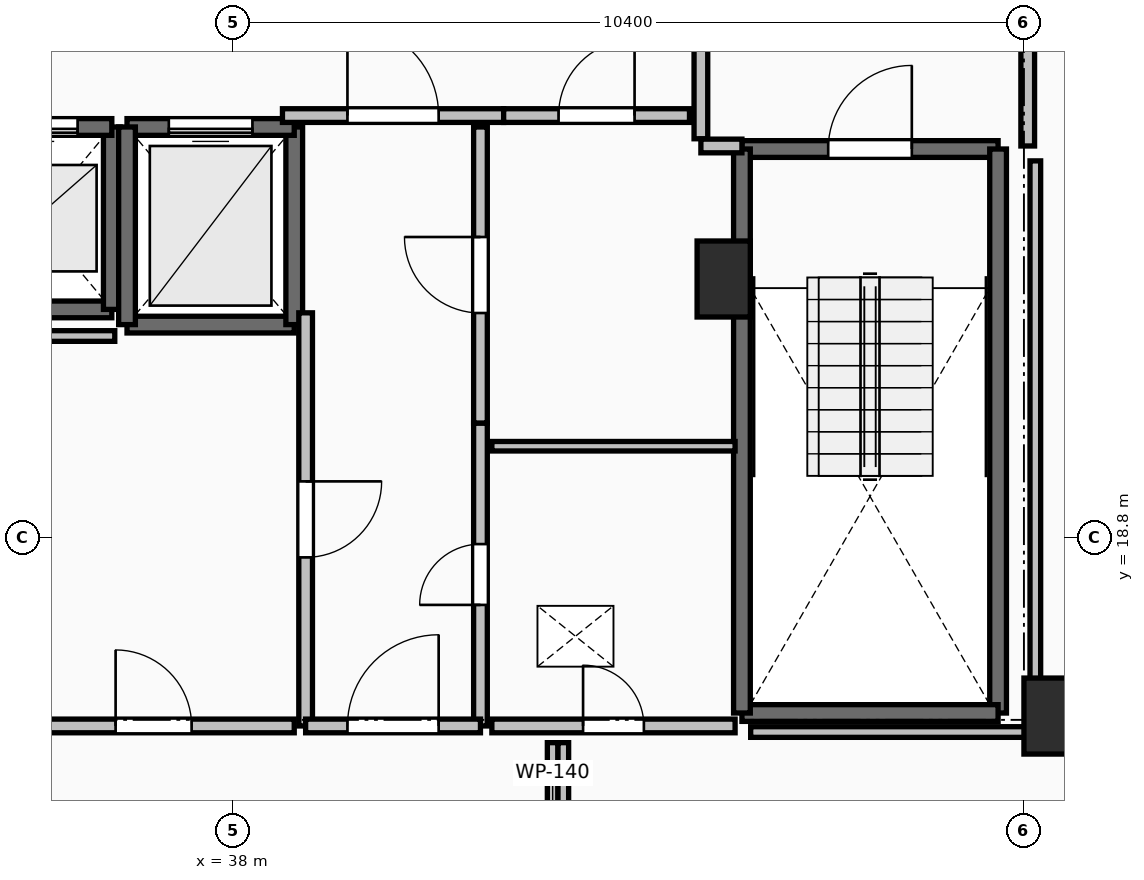
"""IFC4 building model, lengths in metres.
Left out: names, types, materials, properties, quantities, classifications, styles, units other than length and angle.
Written with IfcOpenShell. Run it as: python <this file> out.ifc"""

import sys

from ifc_helpers import new_model, si_unit, direction, frame, frame_2d, origin, origin_2d, place, context, subcontext, project, spatial, rectangle, extrude, element, fill, save


model = new_model("IFC4")
c1 = context("Model", 3, precision=1e-05, world=origin(), true_north=direction((0.0, 1.0)))
c2 = subcontext(c1, "Body", "Model", "MODEL_VIEW")
j1 = project(units=[si_unit("LENGTHUNIT", "METRE"), si_unit("PLANEANGLEUNIT", "RADIAN")], contexts=[c1])
p1 = place(None, origin())
s1 = spatial("IfcSite", under=j1, at=p1, CompositionType="ELEMENT")
p2 = place(p1, origin())
s2 = spatial("IfcBuilding", under=s1, at=p2, CompositionType="ELEMENT")
p3 = place(p2, frame((0.0, 0.0, 189.6)))
s3 = spatial("IfcBuildingStorey", under=s2, at=p3, CompositionType="ELEMENT", Elevation=189.6)
for number, where, z_axis, x_axis in (
    (1, (48.75, 16.45, 0.0), (0.0, 0.0, 1.0), (1.0, 0.0, 0.0)),
    (2, (44.45, 22.2, 0.0), (0.0, 0.0, 1.0), (1.0, 0.0, 0.0)),
):
    element("IfcColumn", number, at=place(p3, frame(where, z_axis=z_axis, x_axis=x_axis)), inside=s3, PredefinedType="PILASTER", context=c2, shape_type="SweptSolid", body=[
        extrude(rectangle(XDim=0.7, YDim=1.0, at=origin_2d()), origin(), (0.0, 0.0, 1.0), 3.5),
    ])
p4 = place(p3, frame((44.69, 23.91, 0.0), z_axis=(0.0, 0.0, 1.0), x_axis=(1.0, 0.0, 0.0)))
e3 = element("IfcWall", 3, at=p4, inside=s3, PredefinedType="SOLIDWALL", context=c2, shape_type="SweptSolid", body=[
    extrude(rectangle(XDim=3.37, YDim=0.22, at=frame_2d((1.685, 0.0))), origin(), (0.0, 0.0, 1.0), 3.24),
])
p5 = place(p4, frame((1.135, 0.0, 0.0)))
e4 = element("IfcOpeningElement", 4, at=p5, cuts=e3, PredefinedType="OPENING", context=c2, shape_type="SweptSolid", body=[
    extrude(rectangle(XDim=1.1, YDim=2.15, at=frame_2d((0.55, 1.075))), frame((0.0, 0.125, 0.0), z_axis=(0.0, -1.0, 0.0), x_axis=(1.0, 0.0, 0.0)), (0.0, 0.0, 1.0), 0.25),
])
p6 = place(p3, frame((48.06, 23.91, 0.0), z_axis=(0.0, 0.0, 1.0), x_axis=(0.0, -1.0, 0.0)))
e5 = element("IfcWall", 5, at=p6, inside=s3, PredefinedType="SOLIDWALL", context=c2, shape_type="SweptSolid", body=[
    extrude(rectangle(XDim=7.42, YDim=0.22, at=frame_2d((3.71, 0.0))), origin(), (0.0, 0.0, 1.0), 3.24),
])
p7 = place(p3, frame((48.06, 16.49, 0.0), z_axis=(0.0, 0.0, 1.0), x_axis=(-1.0, 0.0, 0.0)))
e6 = element("IfcWall", 6, at=p7, inside=s3, PredefinedType="SOLIDWALL", context=c2, shape_type="SweptSolid", body=[
    extrude(rectangle(XDim=3.37, YDim=0.22, at=frame_2d((1.685, 0.0))), origin(), (0.0, 0.0, 1.0), 3.24),
])
p8 = place(p3, frame((44.69, 16.49, 0.0), z_axis=(0.0, 0.0, 1.0), x_axis=(0.0, 1.0, 0.0)))
e7 = element("IfcWall", 7, at=p8, inside=s3, PredefinedType="SOLIDWALL", context=c2, shape_type="SweptSolid", body=[
    extrude(rectangle(XDim=7.42, YDim=0.22, at=frame_2d((3.71, 0.0))), origin(), (0.0, 0.0, 1.0), 3.24),
])
p9 = place(p3, frame((34.4, 21.8, 0.0), z_axis=(0.0, 0.0, 1.0), x_axis=(1.0, 0.0, 0.0)))
e8 = element("IfcWall", 8, at=p9, inside=s3, PredefinedType="SOLIDWALL", context=c2, shape_type="SweptSolid", body=[
    extrude(rectangle(XDim=2.0, YDim=0.22, at=frame_2d((1.0, 0.0))), origin(), (0.0, 0.0, 1.0), 3.24),
])
p10 = place(p3, frame((36.4, 21.8, 0.0), z_axis=(0.0, 0.0, 1.0), x_axis=(0.0, 1.0, 0.0)))
e9 = element("IfcWall", 9, at=p10, inside=s3, PredefinedType="SOLIDWALL", context=c2, shape_type="SweptSolid", body=[
    extrude(rectangle(XDim=2.4, YDim=0.22, at=frame_2d((1.2, 0.0))), origin(), (0.0, 0.0, 1.0), 3.24),
])
p11 = place(p3, frame((36.4, 24.2, 0.0), z_axis=(0.0, 0.0, 1.0), x_axis=(-1.0, 0.0, 0.0)))
e10 = element("IfcWall", 10, at=p11, inside=s3, PredefinedType="SOLIDWALL", context=c2, shape_type="SweptSolid", body=[
    extrude(rectangle(XDim=2.0, YDim=0.22, at=frame_2d((1.0, 0.0))), origin(), (0.0, 0.0, 1.0), 3.24),
])
p12 = place(p11, frame((0.45, 0.0, 0.0)))
e11 = element("IfcOpeningElement", 11, at=p12, cuts=e10, PredefinedType="OPENING", context=c2, shape_type="SweptSolid", body=[
    extrude(rectangle(XDim=1.1, YDim=2.2, at=frame_2d((0.55, 1.1))), frame((0.0, 0.125, 0.0), z_axis=(0.0, -1.0, 0.0), x_axis=(1.0, 0.0, 0.0)), (0.0, 0.0, 1.0), 0.25),
])
p13 = place(p3, frame((36.6, 21.6, 0.0), z_axis=(0.0, 0.0, 1.0), x_axis=(1.0, 0.0, 0.0)))
e12 = element("IfcWall", 12, at=p13, inside=s3, PredefinedType="SOLIDWALL", context=c2, shape_type="SweptSolid", body=[
    extrude(rectangle(XDim=2.2, YDim=0.22, at=frame_2d((1.1, 0.0))), origin(), (0.0, 0.0, 1.0), 3.24),
])
p14 = place(p3, frame((38.8, 21.6, 0.0), z_axis=(0.0, 0.0, 1.0), x_axis=(0.0, 1.0, 0.0)))
e13 = element("IfcWall", 13, at=p14, inside=s3, PredefinedType="SOLIDWALL", context=c2, shape_type="SweptSolid", body=[
    extrude(rectangle(XDim=2.6, YDim=0.22, at=frame_2d((1.3, 0.0))), origin(), (0.0, 0.0, 1.0), 3.24),
])
p15 = place(p3, frame((38.8, 24.2, 0.0), z_axis=(0.0, 0.0, 1.0), x_axis=(-1.0, 0.0, 0.0)))
e14 = element("IfcWall", 14, at=p15, inside=s3, PredefinedType="SOLIDWALL", context=c2, shape_type="SweptSolid", body=[
    extrude(rectangle(XDim=2.2, YDim=0.22, at=frame_2d((1.1, 0.0))), origin(), (0.0, 0.0, 1.0), 3.24),
])
p16 = place(p15, frame((0.55, 0.0, 0.0)))
e15 = element("IfcOpeningElement", 15, at=p16, cuts=e14, PredefinedType="OPENING", context=c2, shape_type="SweptSolid", body=[
    extrude(rectangle(XDim=1.1, YDim=2.2, at=frame_2d((0.55, 1.1))), frame((0.0, 0.125, 0.0), z_axis=(0.0, -1.0, 0.0), x_axis=(1.0, 0.0, 0.0)), (0.0, 0.0, 1.0), 0.25),
])
p17 = place(p3, frame((36.6, 24.2, 0.0), z_axis=(0.0, 0.0, 1.0), x_axis=(0.0, -1.0, 0.0)))
e16 = element("IfcWall", 16, at=p17, inside=s3, PredefinedType="SOLIDWALL", context=c2, shape_type="SweptSolid", body=[
    extrude(rectangle(XDim=2.6, YDim=0.22, at=frame_2d((1.3, 0.0))), origin(), (0.0, 0.0, 1.0), 3.24),
])
p18 = place(p3, frame((44.15, 27.955, 0.0), z_axis=(0.0, 0.0, 1.0), x_axis=(0.0, -1.0, 0.0)))
e17 = element("IfcWall", 17, at=p18, inside=s3, PredefinedType="PARTITIONING", context=c2, shape_type="SweptSolid", body=[
    extrude(rectangle(XDim=3.91, YDim=0.18, at=frame_2d((1.955, 0.0))), origin(), (0.0, 0.0, 1.0), 3.24),
])
p19 = place(p18, frame((1.355, 0.0, 0.0)))
e18 = element("IfcOpeningElement", 18, at=p19, cuts=e17, PredefinedType="OPENING", context=c2, shape_type="SweptSolid", body=[
    extrude(rectangle(XDim=1.2, YDim=2.15, at=frame_2d((0.6, 1.075))), frame((0.0, 0.105, 0.0), z_axis=(0.0, -1.0, 0.0), x_axis=(1.0, 0.0, 0.0)), (0.0, 0.0, 1.0), 0.21),
])
p20 = place(p3, frame((44.15, 23.95, 0.0), z_axis=(0.0, 0.0, 1.0), x_axis=(1.0, 0.0, 0.0)))
e19 = element("IfcWall", 19, at=p20, inside=s3, PredefinedType="PARTITIONING", context=c2, shape_type="SweptSolid", body=[
    extrude(rectangle(XDim=0.54, YDim=0.18, at=frame_2d((0.27, 0.0))), origin(), (0.0, 0.0, 1.0), 3.24),
])
p21 = place(p3, frame((48.45, 23.95, 0.0), z_axis=(0.0, 0.0, 1.0), x_axis=(0.0, 1.0, 0.0)))
e20 = element("IfcWall", 20, at=p21, inside=s3, PredefinedType="PARTITIONING", context=c2, shape_type="SweptSolid", body=[
    extrude(rectangle(XDim=4.05, YDim=0.18, at=frame_2d((2.025, 0.0))), origin(), (0.0, 0.0, 1.0), 3.24),
])
p22 = place(p21, frame((1.425, 0.0, 0.0)))
e21 = element("IfcOpeningElement", 21, at=p22, cuts=e20, PredefinedType="OPENING", context=c2, shape_type="SweptSolid", body=[
    extrude(rectangle(XDim=1.2, YDim=2.15, at=frame_2d((0.6, 1.075))), frame((0.0, 0.105, 0.0), z_axis=(0.0, -1.0, 0.0), x_axis=(1.0, 0.0, 0.0)), (0.0, 0.0, 1.0), 0.21),
])
p23 = place(p3, frame((38.645, 24.35, 0.0), z_axis=(0.0, 0.0, 1.0), x_axis=(1.0, 0.0, 0.0)))
e22 = element("IfcWall", 22, at=p23, inside=s3, PredefinedType="PARTITIONING", context=c2, shape_type="SweptSolid", body=[
    extrude(rectangle(XDim=2.91, YDim=0.18, at=frame_2d((1.455, 0.0))), origin(), (0.0, 0.0, 1.0), 3.24),
])
p24 = place(p23, frame((0.855, 0.0, 0.0)))
e23 = element("IfcOpeningElement", 23, at=p24, cuts=e22, PredefinedType="OPENING", context=c2, shape_type="SweptSolid", body=[
    extrude(rectangle(XDim=1.2, YDim=2.15, at=frame_2d((0.6, 1.075))), frame((0.0, 0.105, 0.0), z_axis=(0.0, -1.0, 0.0), x_axis=(1.0, 0.0, 0.0)), (0.0, 0.0, 1.0), 0.21),
])
p25 = place(p3, frame((41.555, 24.35, 0.0), z_axis=(0.0, 0.0, 1.0), x_axis=(1.0, 0.0, 0.0)))
e24 = element("IfcWall", 24, at=p25, inside=s3, PredefinedType="PARTITIONING", context=c2, shape_type="SweptSolid", body=[
    extrude(rectangle(XDim=2.445, YDim=0.18, at=frame_2d((1.223, 0.0))), origin(), (0.0, 0.0, 1.0), 3.24),
])
p26 = place(p25, frame((0.722, 0.0, 0.0)))
e25 = element("IfcOpeningElement", 25, at=p26, cuts=e24, PredefinedType="OPENING", context=c2, shape_type="SweptSolid", body=[
    extrude(rectangle(XDim=1.0, YDim=2.15, at=frame_2d((0.5, 1.075))), frame((0.0, 0.105, 0.0), z_axis=(0.0, -1.0, 0.0), x_axis=(1.0, 0.0, 0.0)), (0.0, 0.0, 1.0), 0.21),
])
p27 = place(p3, frame((41.25, 16.32, 0.0), z_axis=(0.0, 0.0, 1.0), x_axis=(0.0, 1.0, 0.0)))
e26 = element("IfcWall", 26, at=p27, inside=s3, PredefinedType="PARTITIONING", context=c2, shape_type="SweptSolid", body=[
    extrude(rectangle(XDim=3.985, YDim=0.18, at=frame_2d((1.992, 0.0))), origin(), (0.0, 0.0, 1.0), 3.24),
])
p28 = place(p27, frame((1.593, 0.0, 0.0)))
e27 = element("IfcOpeningElement", 27, at=p28, cuts=e26, PredefinedType="OPENING", context=c2, shape_type="SweptSolid", body=[
    extrude(rectangle(XDim=0.8, YDim=2.05, at=frame_2d((0.4, 1.025))), frame((0.0, 0.105, 0.0), z_axis=(0.0, -1.0, 0.0), x_axis=(1.0, 0.0, 0.0)), (0.0, 0.0, 1.0), 0.21),
])
p29 = place(p3, frame((41.25, 20.305, 0.0), z_axis=(0.0, 0.0, 1.0), x_axis=(0.0, 1.0, 0.0)))
e28 = element("IfcWall", 28, at=p29, inside=s3, PredefinedType="PARTITIONING", context=c2, shape_type="SweptSolid", body=[
    extrude(rectangle(XDim=3.895, YDim=0.18, at=frame_2d((1.948, 0.0))), origin(), (0.0, 0.0, 1.0), 3.24),
])
p30 = place(p29, frame((1.448, 0.0, 0.0)))
e29 = element("IfcOpeningElement", 29, at=p30, cuts=e28, PredefinedType="OPENING", context=c2, shape_type="SweptSolid", body=[
    extrude(rectangle(XDim=1.0, YDim=2.15, at=frame_2d((0.5, 1.075))), frame((0.0, 0.105, 0.0), z_axis=(0.0, -1.0, 0.0), x_axis=(1.0, 0.0, 0.0)), (0.0, 0.0, 1.0), 0.21),
])
p31 = place(p3, frame((38.95, 21.755, 0.0), z_axis=(0.0, 0.0, 1.0), x_axis=(0.0, -1.0, 0.0)))
e30 = element("IfcWall", 30, at=p31, inside=s3, PredefinedType="PARTITIONING", context=c2, shape_type="SweptSolid", body=[
    extrude(rectangle(XDim=5.435, YDim=0.18, at=frame_2d((2.717, 0.0))), origin(), (0.0, 0.0, 1.0), 3.24),
])
p32 = place(p31, frame((2.218, 0.0, 0.0)))
e31 = element("IfcOpeningElement", 31, at=p32, cuts=e30, PredefinedType="OPENING", context=c2, shape_type="SweptSolid", body=[
    extrude(rectangle(XDim=1.0, YDim=2.15, at=frame_2d((0.5, 1.075))), frame((0.0, 0.105, 0.0), z_axis=(0.0, -1.0, 0.0), x_axis=(1.0, 0.0, 0.0)), (0.0, 0.0, 1.0), 0.21),
])
p33 = place(p3, frame((38.95, 16.32, 0.0), z_axis=(0.0, 0.0, 1.0), x_axis=(1.0, 0.0, 0.0)))
e32 = element("IfcWall", 32, at=p33, inside=s3, PredefinedType="PARTITIONING", context=c2, shape_type="SweptSolid", body=[
    extrude(rectangle(XDim=2.3, YDim=0.18, at=frame_2d((1.15, 0.0))), origin(), (0.0, 0.0, 1.0), 3.24),
])
p34 = place(p33, frame((0.55, 0.0, 0.0)))
e33 = element("IfcOpeningElement", 33, at=p34, cuts=e32, PredefinedType="OPENING", context=c2, shape_type="SweptSolid", body=[
    extrude(rectangle(XDim=1.2, YDim=2.15, at=frame_2d((0.6, 1.075))), frame((0.0, 0.105, 0.0), z_axis=(0.0, -1.0, 0.0), x_axis=(1.0, 0.0, 0.0)), (0.0, 0.0, 1.0), 0.21),
])
p35 = place(p3, frame((44.6, 20.0, 0.0), z_axis=(0.0, 0.0, 1.0), x_axis=(-1.0, 0.0, 0.0)))
e34 = element("IfcWall", 34, at=p35, inside=s3, PredefinedType="PARTITIONING", context=c2, shape_type="SweptSolid", body=[
    extrude(rectangle(XDim=3.2, YDim=0.125, at=frame_2d((1.6, 0.0))), origin(), (0.0, 0.0, 1.0), 3.24),
])
p36 = place(p3, frame((41.4, 16.32, 0.0), z_axis=(0.0, 0.0, 1.0), x_axis=(1.0, 0.0, 0.0)))
e35 = element("IfcWall", 35, at=p36, inside=s3, PredefinedType="PARTITIONING", context=c2, shape_type="SweptSolid", body=[
    extrude(rectangle(XDim=3.2, YDim=0.18, at=frame_2d((1.6, 0.0))), origin(), (0.0, 0.0, 1.0), 3.24),
])
p37 = place(p36, frame((1.2, 0.0, 0.0)))
e36 = element("IfcOpeningElement", 36, at=p37, cuts=e35, PredefinedType="OPENING", context=c2, shape_type="SweptSolid", body=[
    extrude(rectangle(XDim=0.8, YDim=2.05, at=frame_2d((0.4, 1.025))), frame((0.0, 0.105, 0.0), z_axis=(0.0, -1.0, 0.0), x_axis=(1.0, 0.0, 0.0)), (0.0, 0.0, 1.0), 0.21),
])
p38 = place(p3, frame((35.1, 16.32, 0.0), z_axis=(0.0, 0.0, 1.0), x_axis=(1.0, 0.0, 0.0)))
e37 = element("IfcWall", 37, at=p38, inside=s3, PredefinedType="PARTITIONING", context=c2, shape_type="SweptSolid", body=[
    extrude(rectangle(XDim=3.7, YDim=0.18, at=frame_2d((1.85, 0.0))), origin(), (0.0, 0.0, 1.0), 3.24),
])
p39 = place(p38, frame((1.35, 0.0, 0.0)))
e38 = element("IfcOpeningElement", 38, at=p39, cuts=e37, PredefinedType="OPENING", context=c2, shape_type="SweptSolid", body=[
    extrude(rectangle(XDim=1.0, YDim=2.15, at=frame_2d((0.5, 1.075))), frame((0.0, 0.105, 0.0), z_axis=(0.0, -1.0, 0.0), x_axis=(1.0, 0.0, 0.0)), (0.0, 0.0, 1.0), 0.21),
])
p40 = place(p3, frame((36.439, 21.45, 0.0), z_axis=(0.0, 0.0, 1.0), x_axis=(-1.0, 0.0, 0.0)))
e39 = element("IfcWall", 39, at=p40, inside=s3, PredefinedType="PARTITIONING", context=c2, shape_type="SweptSolid", body=[
    extrude(rectangle(XDim=1.259, YDim=0.14, at=frame_2d((0.629, 0.0))), origin(), (0.0, 0.0, 1.0), 3.24),
])
p41 = place(p3, frame((42.2, 16.1, 0.0), z_axis=(0.0, 0.0, 1.0), x_axis=(0.0, -1.0, 0.0)))
e40 = element("IfcWall", 40, at=p41, inside=s3, PredefinedType="PARTITIONING", context=c2, shape_type="SweptSolid", body=[
    extrude(rectangle(XDim=1.705, YDim=0.14, at=frame_2d((0.853, 0.0))), origin(), (0.0, 0.0, 1.0), 3.24),
])
p42 = place(p3, frame((42.34, 14.384, 0.0), z_axis=(0.0, 0.0, 1.0), x_axis=(0.0, 1.0, 0.0)))
e41 = element("IfcWall", 41, at=p42, inside=s3, PredefinedType="PARTITIONING", context=c2, shape_type="SweptSolid", body=[
    extrude(rectangle(XDim=1.716, YDim=0.14, at=frame_2d((0.858, 0.0))), origin(), (0.0, 0.0, 1.0), 3.24),
])
p43 = place(p3, frame((44.805, 16.24, 0.0), z_axis=(0.0, 0.0, 1.0), x_axis=(1.0, 0.0, 0.0)))
e42 = element("IfcWall", 42, at=p43, inside=s3, PredefinedType="PARTITIONING", context=c2, shape_type="SweptSolid", body=[
    extrude(rectangle(XDim=3.745, YDim=0.14, at=frame_2d((1.873, 0.0))), origin(), (0.0, 0.0, 1.0), 2.432),
])
p44 = place(p3, frame((48.55, 16.24, 0.0), z_axis=(0.0, 0.0, 1.0), x_axis=(0.0, 1.0, 0.0)))
e43 = element("IfcWall", 43, at=p44, inside=s3, PredefinedType="PARTITIONING", context=c2, shape_type="SweptSolid", body=[
    extrude(rectangle(XDim=7.514, YDim=0.14, at=frame_2d((3.757, 0.0))), origin(), (0.0, 0.0, 1.0), 2.432),
])
p45 = place(p5, origin())
e44 = element("IfcDoor", 44, at=p45, inside=s3, OperationType="SINGLE_SWING_RIGHT", PredefinedType="DOOR", context=c2, shape_type="SweptSolid", body=[
    extrude(rectangle(XDim=1.1, YDim=2.15, at=frame_2d((0.55, 1.075))), frame((0.0, 0.025, 0.0), z_axis=(0.0, -1.0, 0.0), x_axis=(1.0, 0.0, 0.0)), (0.0, 0.0, 1.0), 0.05),
])
fill(e4, e44)
p46 = place(p12, origin())
e45 = element("IfcDoor", 45, at=p46, inside=s3, OperationType="SLIDING_TO_LEFT", PredefinedType="DOOR", context=c2, shape_type="SweptSolid", body=[
    extrude(rectangle(XDim=1.1, YDim=2.2, at=frame_2d((0.55, 1.1))), frame((0.0, 0.025, 0.0), z_axis=(0.0, -1.0, 0.0), x_axis=(1.0, 0.0, 0.0)), (0.0, 0.0, 1.0), 0.05),
])
fill(e11, e45)
p47 = place(p16, origin())
e46 = element("IfcDoor", 46, at=p47, inside=s3, OperationType="SLIDING_TO_LEFT", PredefinedType="DOOR", context=c2, shape_type="SweptSolid", body=[
    extrude(rectangle(XDim=1.1, YDim=2.2, at=frame_2d((0.55, 1.1))), frame((0.0, 0.025, 0.0), z_axis=(0.0, -1.0, 0.0), x_axis=(1.0, 0.0, 0.0)), (0.0, 0.0, 1.0), 0.05),
])
fill(e15, e46)
p48 = place(p24, origin())
e47 = element("IfcDoor", 47, at=p48, inside=s3, OperationType="SINGLE_SWING_LEFT", PredefinedType="DOOR", context=c2, shape_type="SweptSolid", body=[
    extrude(rectangle(XDim=1.2, YDim=2.15, at=frame_2d((0.6, 1.075))), frame((0.0, 0.025, 0.0), z_axis=(0.0, -1.0, 0.0), x_axis=(1.0, 0.0, 0.0)), (0.0, 0.0, 1.0), 0.05),
])
fill(e23, e47)
p49 = place(p26, origin())
e48 = element("IfcDoor", 48, at=p49, inside=s3, OperationType="SINGLE_SWING_RIGHT", PredefinedType="DOOR", context=c2, shape_type="SweptSolid", body=[
    extrude(rectangle(XDim=1.0, YDim=2.15, at=frame_2d((0.5, 1.075))), frame((0.0, 0.025, 0.0), z_axis=(0.0, -1.0, 0.0), x_axis=(1.0, 0.0, 0.0)), (0.0, 0.0, 1.0), 0.05),
])
fill(e25, e48)
p50 = place(p28, origin())
e49 = element("IfcDoor", 49, at=p50, inside=s3, OperationType="SINGLE_SWING_LEFT", PredefinedType="DOOR", context=c2, shape_type="SweptSolid", body=[
    extrude(rectangle(XDim=0.8, YDim=2.05, at=frame_2d((0.4, 1.025))), frame((0.0, 0.025, 0.0), z_axis=(0.0, -1.0, 0.0), x_axis=(1.0, 0.0, 0.0)), (0.0, 0.0, 1.0), 0.05),
])
fill(e27, e49)
p51 = place(p30, origin())
e50 = element("IfcDoor", 50, at=p51, inside=s3, OperationType="SINGLE_SWING_RIGHT", PredefinedType="DOOR", context=c2, shape_type="SweptSolid", body=[
    extrude(rectangle(XDim=1.0, YDim=2.15, at=frame_2d((0.5, 1.075))), frame((0.0, 0.025, 0.0), z_axis=(0.0, -1.0, 0.0), x_axis=(1.0, 0.0, 0.0)), (0.0, 0.0, 1.0), 0.05),
])
fill(e29, e50)
p52 = place(p32, origin())
e51 = element("IfcDoor", 51, at=p52, inside=s3, OperationType="SINGLE_SWING_LEFT", PredefinedType="DOOR", context=c2, shape_type="SweptSolid", body=[
    extrude(rectangle(XDim=1.0, YDim=2.15, at=frame_2d((0.5, 1.075))), frame((0.0, 0.025, 0.0), z_axis=(0.0, -1.0, 0.0), x_axis=(1.0, 0.0, 0.0)), (0.0, 0.0, 1.0), 0.05),
])
fill(e31, e51)
p53 = place(p34, origin())
e52 = element("IfcDoor", 52, at=p53, inside=s3, OperationType="SINGLE_SWING_RIGHT", PredefinedType="DOOR", context=c2, shape_type="SweptSolid", body=[
    extrude(rectangle(XDim=1.2, YDim=2.15, at=frame_2d((0.6, 1.075))), frame((0.0, 0.025, 0.0), z_axis=(0.0, -1.0, 0.0), x_axis=(1.0, 0.0, 0.0)), (0.0, 0.0, 1.0), 0.05),
])
fill(e33, e52)
p54 = place(p37, origin())
e53 = element("IfcDoor", 53, at=p54, inside=s3, OperationType="SINGLE_SWING_LEFT", PredefinedType="DOOR", context=c2, shape_type="SweptSolid", body=[
    extrude(rectangle(XDim=0.8, YDim=2.05, at=frame_2d((0.4, 1.025))), frame((0.0, 0.025, 0.0), z_axis=(0.0, -1.0, 0.0), x_axis=(1.0, 0.0, 0.0)), (0.0, 0.0, 1.0), 0.05),
])
fill(e36, e53)
p55 = place(p39, origin())
e54 = element("IfcDoor", 54, at=p55, inside=s3, OperationType="SINGLE_SWING_LEFT", PredefinedType="DOOR", context=c2, shape_type="SweptSolid", body=[
    extrude(rectangle(XDim=1.0, YDim=2.15, at=frame_2d((0.5, 1.075))), frame((0.0, 0.025, 0.0), z_axis=(0.0, -1.0, 0.0), x_axis=(1.0, 0.0, 0.0)), (0.0, 0.0, 1.0), 0.05),
])
fill(e38, e54)
save(model, sys.argv[1])
